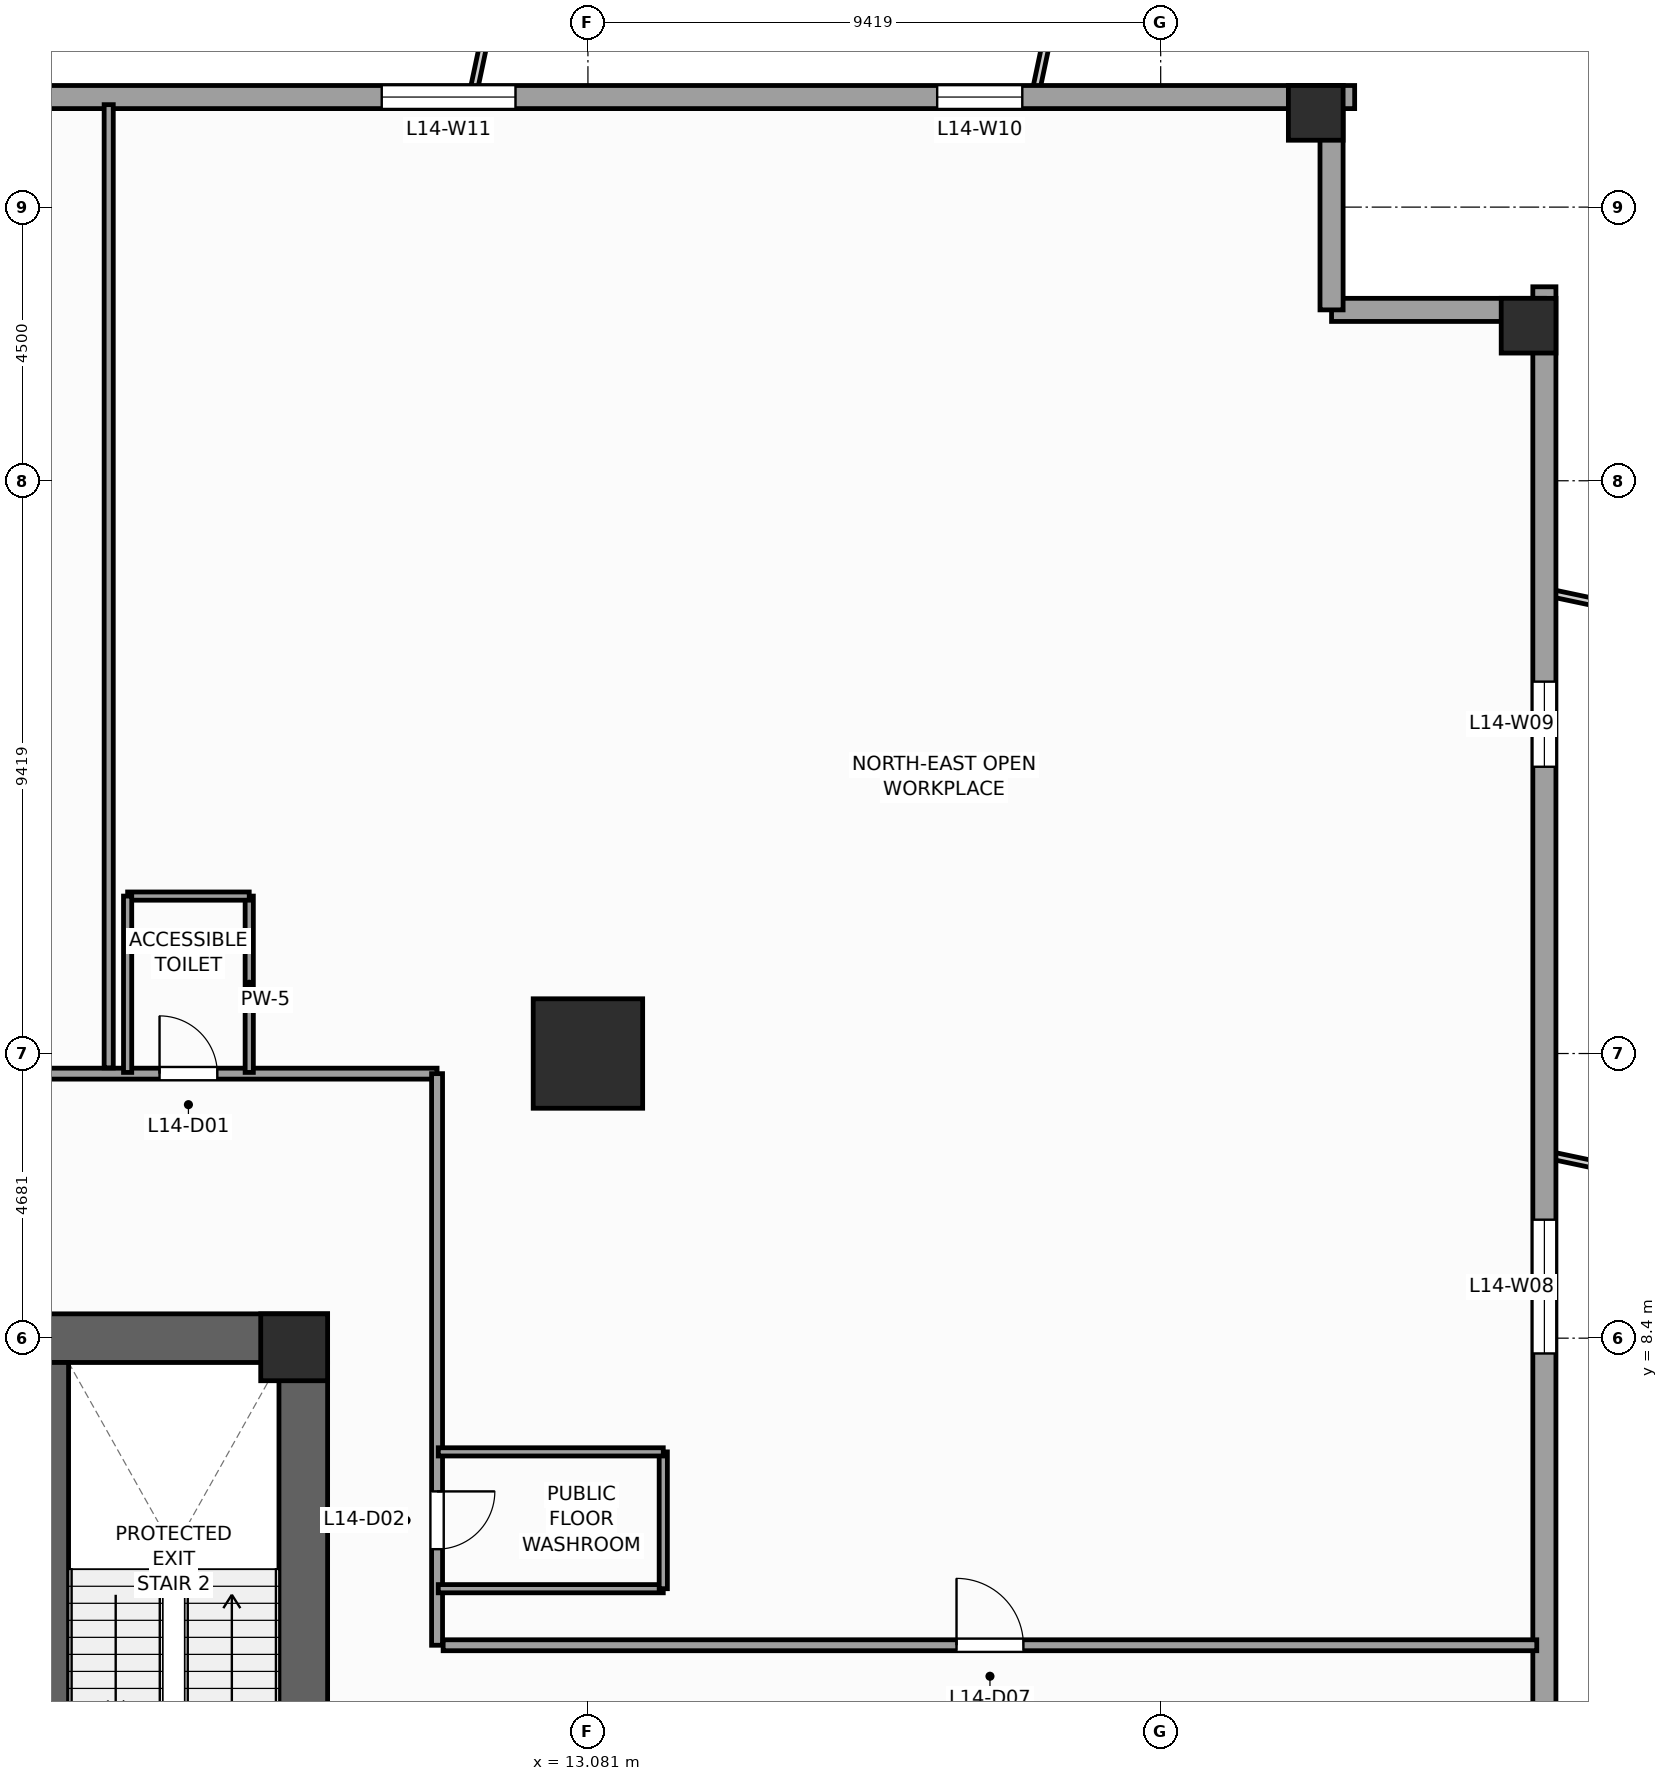
"""IFC4 building model, lengths in metres.
Left out: names, types, materials, properties, quantities, classifications, styles, units other than length and angle.
Written with IfcOpenShell. Run it as: python <this file> out.ifc"""

import sys

from ifc_helpers import new_model, si_unit, direction, frame, frame_2d, origin, origin_2d, place, context, subcontext, project, spatial, rectangle, extrude, source, transform, mapped, element, fill, save


model = new_model("IFC4")
c1 = context("Model", 3, precision=1e-05, world=origin(), true_north=direction((0.0, 1.0)))
c2 = subcontext(c1, "Body", "Model", "MODEL_VIEW")
j1 = project(units=[si_unit("LENGTHUNIT", "METRE"), si_unit("PLANEANGLEUNIT", "RADIAN")], contexts=[c1])
p1 = place(None, origin())
s1 = spatial("IfcSite", under=j1, at=p1, CompositionType="ELEMENT")
p2 = place(p1, origin())
s2 = spatial("IfcBuilding", under=s1, at=p2, CompositionType="ELEMENT")
p3 = place(p2, frame((0.0, 0.0, 62.0)))
s3 = spatial("IfcBuildingStorey", under=s2, at=p3, CompositionType="ELEMENT", Elevation=62.0)
p4 = place(p3, frame((-8.8, 8.4, 0.0), z_axis=(0.0, 0.0, 1.0), x_axis=(1.0, 0.0, 0.0)))
e1 = element("IfcWall", 1, at=p4, inside=s3, PredefinedType="SHEAR", context=c2, shape_type="SweptSolid", body=[
    extrude(rectangle(XDim=17.6, YDim=0.8, at=frame_2d((8.8, 0.0))), origin(), (0.0, 0.0, 1.0), 4.0),
])
p5 = place(p3, frame((8.4, -8.0, 0.0), z_axis=(0.0, 0.0, 1.0), x_axis=(0.0, 1.0, 0.0)))
e2 = element("IfcWall", 2, at=p5, inside=s3, PredefinedType="SHEAR", context=c2, shape_type="SweptSolid", body=[
    extrude(rectangle(XDim=16.0, YDim=0.8, at=frame_2d((8.0, 0.0))), origin(), (0.0, 0.0, 1.0), 4.0),
])
p6 = place(p5, frame((4.69, 0.0, 0.0)))
e3 = element("IfcOpeningElement", 3, at=p6, cuts=e2, PredefinedType="OPENING", context=c2, shape_type="SweptSolid", body=[
    extrude(rectangle(XDim=1.3, YDim=2.2, at=frame_2d((0.65, 1.1))), frame((0.0, 0.41, 0.0), z_axis=(0.0, -1.0, 0.0), x_axis=(1.0, 0.0, 0.0)), (0.0, 0.0, 1.0), 0.82),
])
p7 = place(p3, frame((4.36, -8.0, 0.0), z_axis=(0.0, 0.0, 1.0), x_axis=(0.0, 1.0, 0.0)))
e4 = element("IfcWall", 4, at=p7, inside=s3, PredefinedType="SHEAR", context=c2, shape_type="SweptSolid", body=[
    extrude(rectangle(XDim=16.0, YDim=0.36, at=frame_2d((8.0, 0.0))), origin(), (0.0, 0.0, 1.0), 4.0),
])
m1 = source(origin(), c2, "Body", "SweptSolid", [
    extrude(rectangle(XDim=1.1, YDim=1.1, at=origin_2d()), origin(), (0.0, 0.0, 1.0), 4.0),
])
p8 = place(p3, frame((8.25, 8.25, 0.0), z_axis=(0.0, 0.0, 1.0), x_axis=(1.0, 0.0, 0.0)))
e5 = element("IfcColumn", 5, at=p8, inside=s3, PredefinedType="PILASTER", context=c2, shape_type="MappedRepresentation", body=[
    mapped(m1, transform((0.0, 0.0, 0.0), scale=1.0)),
])
m2 = source(origin(), c2, "Body", "SweptSolid", [
    extrude(rectangle(XDim=1.8, YDim=1.8, at=origin_2d()), origin(), (0.0, 0.0, 1.0), 4.0),
])
p9 = place(p3, frame((13.081, 13.081, 0.0), z_axis=(0.0, 0.0, 1.0), x_axis=(1.0, 0.0, 0.0)))
e6 = element("IfcColumn", 6, at=p9, inside=s3, PredefinedType="COLUMN", context=c2, shape_type="MappedRepresentation", body=[
    mapped(m2, transform((0.0, 0.0, 0.0), scale=1.0)),
])
m3 = source(origin(), c2, "Body", "SweptSolid", [
    extrude(rectangle(XDim=0.9, YDim=0.9, at=origin_2d()), origin(), (0.0, 0.0, 1.0), 4.0),
])
for number, where, z_axis, x_axis in (
    (7, (28.55, 25.05, 0.0), (0.0, 0.0, 1.0), (1.0, 0.0, 0.0)),
    (8, (25.05, 28.55, 0.0), (0.0, 0.0, 1.0), (1.0, 0.0, 0.0)),
):
    element("IfcColumn", number, at=place(p3, frame(where, z_axis=z_axis, x_axis=x_axis)), inside=s3, PredefinedType="COLUMN", context=c2, shape_type="MappedRepresentation", body=[
        mapped(m3, transform((0.0, 0.0, 0.0), scale=1.0)),
    ])
p10 = place(p3, frame((28.81, -25.69, 0.0), z_axis=(0.0, 0.0, 1.0), x_axis=(0.0, 1.0, 0.0)))
e9 = element("IfcWall", 9, at=p10, inside=s3, PredefinedType="STANDARD", context=c2, shape_type="SweptSolid", body=[
    extrude(rectangle(XDim=51.38, YDim=0.38, at=frame_2d((25.69, 0.0))), origin(), (0.0, 0.0, 1.0), 3.12),
])
p11 = place(p10, frame((5.466, 0.0, 0.49)))
e10 = element("IfcOpeningElement", 10, at=p11, cuts=e9, PredefinedType="OPENING", context=c2, shape_type="SweptSolid", body=[
    extrude(rectangle(XDim=1.4, YDim=2.4, at=frame_2d((0.7, 1.2))), frame((0.0, 0.2, 0.0), z_axis=(0.0, -1.0, 0.0), x_axis=(1.0, 0.0, 0.0)), (0.0, 0.0, 1.0), 0.4),
])
p12 = place(p10, frame((13.8, 0.0, 0.49)))
e11 = element("IfcOpeningElement", 11, at=p12, cuts=e9, PredefinedType="OPENING", context=c2, shape_type="SweptSolid", body=[
    extrude(rectangle(XDim=2.2, YDim=2.4, at=frame_2d((1.1, 1.2))), frame((0.0, 0.2, 0.0), z_axis=(0.0, -1.0, 0.0), x_axis=(1.0, 0.0, 0.0)), (0.0, 0.0, 1.0), 0.4),
])
p13 = place(p10, frame((22.062, 0.0, 0.49)))
e12 = element("IfcOpeningElement", 12, at=p13, cuts=e9, PredefinedType="OPENING", context=c2, shape_type="SweptSolid", body=[
    extrude(rectangle(XDim=2.2, YDim=2.4, at=frame_2d((1.1, 1.2))), frame((0.0, 0.2, 0.0), z_axis=(0.0, -1.0, 0.0), x_axis=(1.0, 0.0, 0.0)), (0.0, 0.0, 1.0), 0.4),
])
p14 = place(p10, frame((33.838, 0.0, 0.49)))
e13 = element("IfcOpeningElement", 13, at=p14, cuts=e9, PredefinedType="OPENING", context=c2, shape_type="SweptSolid", body=[
    extrude(rectangle(XDim=2.2, YDim=2.4, at=frame_2d((1.1, 1.2))), frame((0.0, 0.2, 0.0), z_axis=(0.0, -1.0, 0.0), x_axis=(1.0, 0.0, 0.0)), (0.0, 0.0, 1.0), 0.4),
])
p15 = place(p10, frame((43.487, 0.0, 0.49)))
e14 = element("IfcOpeningElement", 14, at=p15, cuts=e9, PredefinedType="OPENING", context=c2, shape_type="SweptSolid", body=[
    extrude(rectangle(XDim=1.4, YDim=2.4, at=frame_2d((0.7, 1.2))), frame((0.0, 0.2, 0.0), z_axis=(0.0, -1.0, 0.0), x_axis=(1.0, 0.0, 0.0)), (0.0, 0.0, 1.0), 0.4),
])
p16 = place(p3, frame((28.81, 25.31, 0.0), z_axis=(0.0, 0.0, 1.0), x_axis=(-1.0, 0.0, 0.0)))
e15 = element("IfcWall", 15, at=p16, inside=s3, PredefinedType="STANDARD", context=c2, shape_type="SweptSolid", body=[
    extrude(rectangle(XDim=3.5, YDim=0.38, at=frame_2d((1.75, 0.0))), origin(), (0.0, 0.0, 1.0), 3.72),
])
p17 = place(p3, frame((25.31, 25.31, 0.0), z_axis=(0.0, 0.0, 1.0), x_axis=(0.0, 1.0, 0.0)))
e16 = element("IfcWall", 16, at=p17, inside=s3, PredefinedType="STANDARD", context=c2, shape_type="SweptSolid", body=[
    extrude(rectangle(XDim=3.69, YDim=0.38, at=frame_2d((1.845, 0.0))), origin(), (0.0, 0.0, 1.0), 3.72),
])
p18 = place(p3, frame((25.69, 28.81, 0.0), z_axis=(0.0, 0.0, 1.0), x_axis=(-1.0, 0.0, 0.0)))
e17 = element("IfcWall", 17, at=p18, inside=s3, PredefinedType="STANDARD", context=c2, shape_type="SweptSolid", body=[
    extrude(rectangle(XDim=51.38, YDim=0.38, at=frame_2d((25.69, 0.0))), origin(), (0.0, 0.0, 1.0), 3.12),
])
p19 = place(p18, frame((30.765, 0.0, 0.0)))
e18 = element("IfcOpeningElement", 18, at=p19, cuts=e17, PredefinedType="OPENING", context=c2, shape_type="SweptSolid", body=[
    extrude(rectangle(XDim=1.05, YDim=2.25, at=frame_2d((0.525, 1.125))), frame((0.0, 0.2, 0.0), z_axis=(0.0, -1.0, 0.0), x_axis=(1.0, 0.0, 0.0)), (0.0, 0.0, 1.0), 0.4),
])
p20 = place(p18, frame((5.466, 0.0, 0.49)))
e19 = element("IfcOpeningElement", 19, at=p20, cuts=e17, PredefinedType="OPENING", context=c2, shape_type="SweptSolid", body=[
    extrude(rectangle(XDim=1.4, YDim=2.4, at=frame_2d((0.7, 1.2))), frame((0.0, 0.2, 0.0), z_axis=(0.0, -1.0, 0.0), x_axis=(1.0, 0.0, 0.0)), (0.0, 0.0, 1.0), 0.4),
])
p21 = place(p18, frame((13.8, 0.0, 0.49)))
e20 = element("IfcOpeningElement", 20, at=p21, cuts=e17, PredefinedType="OPENING", context=c2, shape_type="SweptSolid", body=[
    extrude(rectangle(XDim=2.2, YDim=2.4, at=frame_2d((1.1, 1.2))), frame((0.0, 0.2, 0.0), z_axis=(0.0, -1.0, 0.0), x_axis=(1.0, 0.0, 0.0)), (0.0, 0.0, 1.0), 0.4),
])
p22 = place(p18, frame((22.062, 0.0, 0.49)))
e21 = element("IfcOpeningElement", 21, at=p22, cuts=e17, PredefinedType="OPENING", context=c2, shape_type="SweptSolid", body=[
    extrude(rectangle(XDim=2.2, YDim=2.4, at=frame_2d((1.1, 1.2))), frame((0.0, 0.2, 0.0), z_axis=(0.0, -1.0, 0.0), x_axis=(1.0, 0.0, 0.0)), (0.0, 0.0, 1.0), 0.4),
])
p23 = place(p18, frame((33.838, 0.0, 0.49)))
e22 = element("IfcOpeningElement", 22, at=p23, cuts=e17, PredefinedType="OPENING", context=c2, shape_type="SweptSolid", body=[
    extrude(rectangle(XDim=2.2, YDim=2.4, at=frame_2d((1.1, 1.2))), frame((0.0, 0.2, 0.0), z_axis=(0.0, -1.0, 0.0), x_axis=(1.0, 0.0, 0.0)), (0.0, 0.0, 1.0), 0.4),
])
p24 = place(p18, frame((43.487, 0.0, 0.49)))
e23 = element("IfcOpeningElement", 23, at=p24, cuts=e17, PredefinedType="OPENING", context=c2, shape_type="SweptSolid", body=[
    extrude(rectangle(XDim=1.4, YDim=2.4, at=frame_2d((0.7, 1.2))), frame((0.0, 0.2, 0.0), z_axis=(0.0, -1.0, 0.0), x_axis=(1.0, 0.0, 0.0)), (0.0, 0.0, 1.0), 0.4),
])
p25 = place(p3, frame((-10.6, 12.75, 0.0), z_axis=(0.0, 0.0, 1.0), x_axis=(1.0, 0.0, 0.0)))
e24 = element("IfcWall", 24, at=p25, inside=s3, PredefinedType="PARTITIONING", context=c2, shape_type="SweptSolid", body=[
    extrude(rectangle(XDim=21.2, YDim=0.18, at=frame_2d((10.6, 0.0))), origin(), (0.0, 0.0, 1.0), 3.72),
])
p26 = place(p25, frame((16.636, 0.0, 0.0)))
e25 = element("IfcOpeningElement", 25, at=p26, cuts=e24, PredefinedType="OPENING", context=c2, shape_type="SweptSolid", body=[
    extrude(rectangle(XDim=0.95, YDim=2.1, at=frame_2d((0.475, 1.05))), frame((0.0, 0.1, 0.0), z_axis=(0.0, -1.0, 0.0), x_axis=(1.0, 0.0, 0.0)), (0.0, 0.0, 1.0), 0.2),
])
p27 = place(p25, frame((3.314, 0.0, 0.0)))
e26 = element("IfcOpeningElement", 26, at=p27, cuts=e24, PredefinedType="OPENING", context=c2, shape_type="SweptSolid", body=[
    extrude(rectangle(XDim=1.1, YDim=2.2, at=frame_2d((0.55, 1.1))), frame((0.0, 0.1, 0.0), z_axis=(0.0, -1.0, 0.0), x_axis=(1.0, 0.0, 0.0)), (0.0, 0.0, 1.0), 0.2),
])
p28 = place(p25, frame((11.05, 0.0, 0.0)))
e27 = element("IfcOpeningElement", 27, at=p28, cuts=e24, PredefinedType="OPENING", context=c2, shape_type="SweptSolid", body=[
    extrude(rectangle(XDim=1.1, YDim=2.2, at=frame_2d((0.55, 1.1))), frame((0.0, 0.1, 0.0), z_axis=(0.0, -1.0, 0.0), x_axis=(1.0, 0.0, 0.0)), (0.0, 0.0, 1.0), 0.2),
])
p29 = place(p3, frame((10.6, 3.35, 0.0), z_axis=(0.0, 0.0, 1.0), x_axis=(0.0, 1.0, 0.0)))
e28 = element("IfcWall", 28, at=p29, inside=s3, PredefinedType="PARTITIONING", context=c2, shape_type="SweptSolid", body=[
    extrude(rectangle(XDim=9.4, YDim=0.18, at=frame_2d((4.7, 0.0))), origin(), (0.0, 0.0, 1.0), 3.72),
])
p30 = place(p29, frame((1.58, 0.0, 0.0)))
e29 = element("IfcOpeningElement", 29, at=p30, cuts=e28, PredefinedType="OPENING", context=c2, shape_type="SweptSolid", body=[
    extrude(rectangle(XDim=0.95, YDim=2.1, at=frame_2d((0.475, 1.05))), frame((0.0, 0.1, 0.0), z_axis=(0.0, -1.0, 0.0), x_axis=(1.0, 0.0, 0.0)), (0.0, 0.0, 1.0), 0.2),
])
p31 = place(p3, frame((10.7, 3.35, 0.0), z_axis=(0.0, 0.0, 1.0), x_axis=(1.0, 0.0, 0.0)))
e30 = element("IfcWall", 30, at=p31, inside=s3, PredefinedType="PARTITIONING", context=c2, shape_type="SweptSolid", body=[
    extrude(rectangle(XDim=17.985, YDim=0.18, at=frame_2d((8.993, 0.0))), origin(), (0.0, 0.0, 1.0), 3.72),
])
p32 = place(p31, frame((8.442, 0.0, 0.0)))
e31 = element("IfcOpeningElement", 31, at=p32, cuts=e30, PredefinedType="OPENING", context=c2, shape_type="SweptSolid", body=[
    extrude(rectangle(XDim=1.1, YDim=2.2, at=frame_2d((0.55, 1.1))), frame((0.0, 0.1, 0.0), z_axis=(0.0, -1.0, 0.0), x_axis=(1.0, 0.0, 0.0)), (0.0, 0.0, 1.0), 0.2),
])
p33 = place(p3, frame((5.2, 12.845, 0.0), z_axis=(0.0, 0.0, 1.0), x_axis=(0.0, 1.0, 0.0)))
e32 = element("IfcWall", 32, at=p33, inside=s3, PredefinedType="PARTITIONING", context=c2, shape_type="SweptSolid", body=[
    extrude(rectangle(XDim=15.84, YDim=0.15, at=frame_2d((7.92, 0.0))), origin(), (0.0, 0.0, 1.0), 3.72),
])
p34 = place(p3, frame((7.511, 12.77, 0.0), z_axis=(0.0, 0.0, 1.0), x_axis=(0.0, 1.0, 0.0)))
e33 = element("IfcWall", 33, at=p34, inside=s3, PredefinedType="PARTITIONING", context=c2, shape_type="SweptSolid", body=[
    extrude(rectangle(XDim=2.9, YDim=0.135, at=frame_2d((1.45, 0.0))), origin(), (0.0, 0.0, 1.0), 3.72),
])
p35 = place(p3, frame((5.511, 15.67, 0.0), z_axis=(0.0, 0.0, 1.0), x_axis=(1.0, 0.0, 0.0)))
e34 = element("IfcWall", 34, at=p35, inside=s3, PredefinedType="PARTITIONING", context=c2, shape_type="SweptSolid", body=[
    extrude(rectangle(XDim=2.0, YDim=0.135, at=frame_2d((1.0, 0.0))), origin(), (0.0, 0.0, 1.0), 3.22),
])
p36 = place(p3, frame((5.511, 12.77, 0.0), z_axis=(0.0, 0.0, 1.0), x_axis=(0.0, 1.0, 0.0)))
e35 = element("IfcWall", 35, at=p36, inside=s3, PredefinedType="PARTITIONING", context=c2, shape_type="SweptSolid", body=[
    extrude(rectangle(XDim=2.9, YDim=0.135, at=frame_2d((1.45, 0.0))), origin(), (0.0, 0.0, 1.0), 3.72),
])
p37 = place(p3, frame((10.62, 4.28, 0.0), z_axis=(0.0, 0.0, 1.0), x_axis=(1.0, 0.0, 0.0)))
e36 = element("IfcWall", 36, at=p37, inside=s3, PredefinedType="PARTITIONING", context=c2, shape_type="SweptSolid", body=[
    extrude(rectangle(XDim=3.7, YDim=0.135, at=frame_2d((1.85, 0.0))), origin(), (0.0, 0.0, 1.0), 3.72),
])
p38 = place(p3, frame((14.32, 4.28, 0.0), z_axis=(0.0, 0.0, 1.0), x_axis=(0.0, 1.0, 0.0)))
e37 = element("IfcWall", 37, at=p38, inside=s3, PredefinedType="PARTITIONING", context=c2, shape_type="SweptSolid", body=[
    extrude(rectangle(XDim=2.25, YDim=0.135, at=frame_2d((1.125, 0.0))), origin(), (0.0, 0.0, 1.0), 3.72),
])
p39 = place(p3, frame((10.62, 6.53, 0.0), z_axis=(0.0, 0.0, 1.0), x_axis=(1.0, 0.0, 0.0)))
e38 = element("IfcWall", 38, at=p39, inside=s3, PredefinedType="PARTITIONING", context=c2, shape_type="SweptSolid", body=[
    extrude(rectangle(XDim=3.7, YDim=0.135, at=frame_2d((1.85, 0.0))), origin(), (0.0, 0.0, 1.0), 3.72),
])
m4 = source(origin(), c2, "Body", "SweptSolid", [
    extrude(rectangle(XDim=2.2, YDim=2.4, at=frame_2d((1.1, 1.2))), frame((0.0, 0.03, 0.0), z_axis=(0.0, -1.0, 0.0), x_axis=(1.0, 0.0, 0.0)), (0.0, 0.0, 1.0), 0.06),
])
p40 = place(p14, origin())
e39 = element("IfcWindow", 39, at=p40, inside=s3, PartitioningType="SINGLE_PANEL", PredefinedType="WINDOW", context=c2, shape_type="MappedRepresentation", body=[
    mapped(m4, transform((0.0, 0.0, 0.0), scale=1.0)),
])
fill(e13, e39)
m5 = source(origin(), c2, "Body", "SweptSolid", [
    extrude(rectangle(XDim=1.4, YDim=2.4, at=frame_2d((0.7, 1.2))), frame((0.0, 0.03, 0.0), z_axis=(0.0, -1.0, 0.0), x_axis=(1.0, 0.0, 0.0)), (0.0, 0.0, 1.0), 0.06),
])
p41 = place(p15, origin())
e40 = element("IfcWindow", 40, at=p41, inside=s3, PartitioningType="SINGLE_PANEL", PredefinedType="WINDOW", context=c2, shape_type="MappedRepresentation", body=[
    mapped(m5, transform((0.0, 0.0, 0.0), scale=1.0)),
])
fill(e14, e40)
p42 = place(p20, origin())
e41 = element("IfcWindow", 41, at=p42, inside=s3, PartitioningType="SINGLE_PANEL", PredefinedType="WINDOW", context=c2, shape_type="MappedRepresentation", body=[
    mapped(m5, transform((0.0, 0.0, 0.0), scale=1.0)),
])
fill(e19, e41)
p43 = place(p21, origin())
e42 = element("IfcWindow", 42, at=p43, inside=s3, PartitioningType="SINGLE_PANEL", PredefinedType="WINDOW", context=c2, shape_type="MappedRepresentation", body=[
    mapped(m4, transform((0.0, 0.0, 0.0), scale=1.0)),
])
fill(e20, e42)
m6 = source(origin(), c2, "Body", "SweptSolid", [
    extrude(rectangle(XDim=0.95, YDim=2.1, at=frame_2d((0.475, 1.05))), frame((0.0, 0.025, 0.0), z_axis=(0.0, -1.0, 0.0), x_axis=(1.0, 0.0, 0.0)), (0.0, 0.0, 1.0), 0.05),
])
p44 = place(p26, origin())
e43 = element("IfcDoor", 43, at=p44, inside=s3, OperationType="SINGLE_SWING_LEFT", PredefinedType="DOOR", context=c2, shape_type="MappedRepresentation", body=[
    mapped(m6, transform((0.0, 0.0, 0.0), scale=1.0)),
])
fill(e25, e43)
p45 = place(p30, frame((0.95, 0.0, 0.0), z_axis=(0.0, 0.0, 1.0), x_axis=(-1.0, 0.0, 0.0)))
e44 = element("IfcDoor", 44, at=p45, inside=s3, OperationType="SINGLE_SWING_RIGHT", PredefinedType="DOOR", context=c2, shape_type="MappedRepresentation", body=[
    mapped(m6, transform((0.0, 0.0, 0.0), scale=1.0)),
])
fill(e29, e44)
m7 = source(origin(), c2, "Body", "SweptSolid", [
    extrude(rectangle(XDim=1.1, YDim=2.2, at=frame_2d((0.55, 1.1))), frame((0.0, 0.025, 0.0), z_axis=(0.0, -1.0, 0.0), x_axis=(1.0, 0.0, 0.0)), (0.0, 0.0, 1.0), 0.05),
])
p46 = place(p32, origin())
e45 = element("IfcDoor", 45, at=p46, inside=s3, OperationType="SINGLE_SWING_LEFT", PredefinedType="DOOR", context=c2, shape_type="MappedRepresentation", body=[
    mapped(m7, transform((0.0, 0.0, 0.0), scale=1.0)),
])
fill(e31, e45)
save(model, sys.argv[1])
